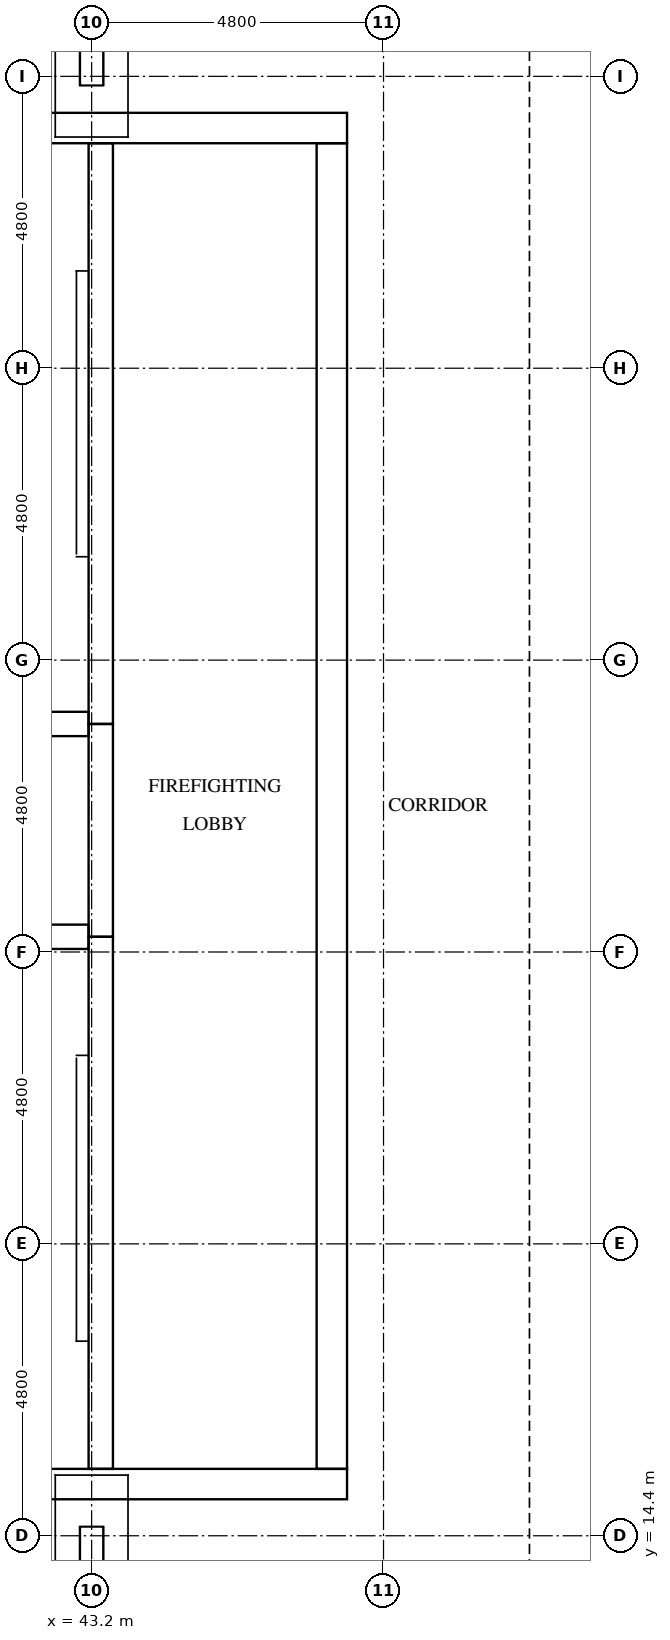
"""IFC4 building model, lengths in metres.
Left out: names, types, materials, properties, quantities, classifications, styles, units other than length and angle.
Written with IfcOpenShell. Run it as: python <this file> out.ifc"""

import sys

from ifc_helpers import new_model, si_unit, direction, frame, frame_2d, origin, place, context, subcontext, project, spatial, rectangle, extrude, element, fill, save


model = new_model("IFC4")
c1 = context("Model", 3, precision=1e-05, world=origin(), true_north=direction((0.0, 1.0)))
c2 = subcontext(c1, "Body", "Model", "MODEL_VIEW")
j1 = project(units=[si_unit("LENGTHUNIT", "METRE"), si_unit("PLANEANGLEUNIT", "RADIAN")], contexts=[c1])
p1 = place(None, origin())
s1 = spatial("IfcSite", under=j1, at=p1, CompositionType="ELEMENT")
p2 = place(p1, origin())
s2 = spatial("IfcBuilding", under=s1, at=p2, CompositionType="ELEMENT")
p3 = place(p2, frame((0.0, 0.0, 263.2)))
s3 = spatial("IfcBuildingStorey", under=s2, at=p3, CompositionType="ELEMENT", Elevation=263.2)
p4 = place(p3, frame((15.0, 15.25, 0.0), z_axis=(0.0, 0.0, 1.0), x_axis=(1.0, 0.0, 0.0)))
e1 = element("IfcWall", 1, at=p4, inside=s3, PredefinedType="SHEAR", context=c2, shape_type="SweptSolid", body=[
    extrude(rectangle(XDim=32.4, YDim=0.5, at=frame_2d((16.2, 0.0))), origin(), (0.0, 0.0, 1.0), 5.1),
])
p5 = place(p4, frame((15.3, 0.0, 0.0)))
e2 = element("IfcOpeningElement", 2, at=p5, cuts=e1, PredefinedType="OPENING", context=c2, shape_type="SweptSolid", body=[
    extrude(rectangle(XDim=1.8, YDim=2.1, at=frame_2d((0.9, 1.05))), frame((0.0, 0.26, 0.0), z_axis=(0.0, -1.0, 0.0), x_axis=(1.0, 0.0, 0.0)), (0.0, 0.0, 1.0), 0.52),
])
p6 = place(p3, frame((15.0, 37.55, 0.0), z_axis=(0.0, 0.0, 1.0), x_axis=(1.0, 0.0, 0.0)))
e3 = element("IfcWall", 3, at=p6, inside=s3, PredefinedType="SHEAR", context=c2, shape_type="SweptSolid", body=[
    extrude(rectangle(XDim=32.4, YDim=0.5, at=frame_2d((16.2, 0.0))), origin(), (0.0, 0.0, 1.0), 5.1),
])
p7 = place(p6, frame((15.3, 0.0, 0.0)))
e4 = element("IfcOpeningElement", 4, at=p7, cuts=e3, PredefinedType="OPENING", context=c2, shape_type="SweptSolid", body=[
    extrude(rectangle(XDim=1.8, YDim=2.1, at=frame_2d((0.9, 1.05))), frame((0.0, 0.26, 0.0), z_axis=(0.0, -1.0, 0.0), x_axis=(1.0, 0.0, 0.0)), (0.0, 0.0, 1.0), 0.52),
])
p8 = place(p6, frame((1.282, 0.0, 0.0)))
e5 = element("IfcOpeningElement", 5, at=p8, cuts=e3, PredefinedType="OPENING", context=c2, shape_type="SweptSolid", body=[
    extrude(rectangle(XDim=1.0, YDim=2.1, at=frame_2d((0.5, 1.05))), frame((0.0, 0.26, 0.0), z_axis=(0.0, -1.0, 0.0), x_axis=(1.0, 0.0, 0.0)), (0.0, 0.0, 1.0), 0.52),
])
p9 = place(p6, frame((5.082, 0.0, 0.0)))
e6 = element("IfcOpeningElement", 6, at=p9, cuts=e3, PredefinedType="OPENING", context=c2, shape_type="SweptSolid", body=[
    extrude(rectangle(XDim=1.0, YDim=2.1, at=frame_2d((0.5, 1.05))), frame((0.0, 0.26, 0.0), z_axis=(0.0, -1.0, 0.0), x_axis=(1.0, 0.0, 0.0)), (0.0, 0.0, 1.0), 0.52),
])
p10 = place(p3, frame((47.15, 15.5, 0.0), z_axis=(0.0, 0.0, 1.0), x_axis=(0.0, 1.0, 0.0)))
e7 = element("IfcWall", 7, at=p10, inside=s3, PredefinedType="SHEAR", context=c2, shape_type="SweptSolid", body=[
    extrude(rectangle(XDim=21.8, YDim=0.5, at=frame_2d((10.9, 0.0))), origin(), (0.0, 0.0, 1.0), 5.1),
])
p11 = place(p10, frame((10.6, 0.0, 0.0)))
e8 = element("IfcOpeningElement", 8, at=p11, cuts=e7, PredefinedType="OPENING", context=c2, shape_type="SweptSolid", body=[
    extrude(rectangle(XDim=1.2, YDim=2.1, at=frame_2d((0.6, 1.05))), frame((0.0, 0.26, 0.0), z_axis=(0.0, -1.0, 0.0), x_axis=(1.0, 0.0, 0.0)), (0.0, 0.0, 1.0), 0.52),
])
p12 = place(p3, frame((43.35, 15.5, 0.0), z_axis=(0.0, 0.0, 1.0), x_axis=(0.0, 1.0, 0.0)))
e9 = element("IfcWall", 9, at=p12, inside=s3, PredefinedType="SHEAR", context=c2, shape_type="SweptSolid", body=[
    extrude(rectangle(XDim=8.75, YDim=0.4, at=frame_2d((4.375, 0.0))), origin(), (0.0, 0.0, 1.0), 5.1),
])
p13 = place(p12, frame((0.7, 0.0, 0.0)))
e10 = element("IfcOpeningElement", 10, at=p13, cuts=e9, PredefinedType="OPENING", context=c2, shape_type="SweptSolid", body=[
    extrude(rectangle(XDim=1.2, YDim=2.1, at=frame_2d((0.6, 1.05))), frame((0.0, 0.21, 0.0), z_axis=(0.0, -1.0, 0.0), x_axis=(1.0, 0.0, 0.0)), (0.0, 0.0, 1.0), 0.42),
])
p14 = place(p3, frame((43.35, 24.25, 0.0), z_axis=(0.0, 0.0, 1.0), x_axis=(0.0, 1.0, 0.0)))
e11 = element("IfcWall", 11, at=p14, inside=s3, PredefinedType="SHEAR", context=c2, shape_type="SweptSolid", body=[
    extrude(rectangle(XDim=3.5, YDim=0.4, at=frame_2d((1.75, 0.0))), origin(), (0.0, 0.0, 1.0), 5.1),
])
p15 = place(p14, frame((1.2, 0.0, 0.0)))
e12 = element("IfcOpeningElement", 12, at=p15, cuts=e11, PredefinedType="OPENING", context=c2, shape_type="SweptSolid", body=[
    extrude(rectangle(XDim=1.1, YDim=2.1, at=frame_2d((0.55, 1.05))), frame((0.0, 0.21, 0.0), z_axis=(0.0, -1.0, 0.0), x_axis=(1.0, 0.0, 0.0)), (0.0, 0.0, 1.0), 0.42),
])
p16 = place(p3, frame((43.35, 27.75, 0.0), z_axis=(0.0, 0.0, 1.0), x_axis=(0.0, 1.0, 0.0)))
e13 = element("IfcWall", 13, at=p16, inside=s3, PredefinedType="SHEAR", context=c2, shape_type="SweptSolid", body=[
    extrude(rectangle(XDim=9.55, YDim=0.4, at=frame_2d((4.775, 0.0))), origin(), (0.0, 0.0, 1.0), 5.1),
])
p17 = place(p16, frame((7.65, 0.0, 0.0)))
e14 = element("IfcOpeningElement", 14, at=p17, cuts=e13, PredefinedType="OPENING", context=c2, shape_type="SweptSolid", body=[
    extrude(rectangle(XDim=1.2, YDim=2.1, at=frame_2d((0.6, 1.05))), frame((0.0, 0.21, 0.0), z_axis=(0.0, -1.0, 0.0), x_axis=(1.0, 0.0, 0.0)), (0.0, 0.0, 1.0), 0.42),
])
for number, where, z_axis, x_axis in (
    (15, (39.5, 24.25, 0.0), (0.0, 0.0, 1.0), (1.0, 0.0, 0.0)),
    (16, (39.5, 27.75, 0.0), (0.0, 0.0, 1.0), (1.0, 0.0, 0.0)),
):
    element("IfcWall", number, at=place(p3, frame(where, z_axis=z_axis, x_axis=x_axis)), inside=s3, PredefinedType="SHEAR", context=c2, shape_type="SweptSolid", body=[
        extrude(rectangle(XDim=3.65, YDim=0.4, at=frame_2d((1.825, 0.0))), origin(), (0.0, 0.0, 1.0), 5.1),
    ])
p18 = place(p15, origin())
e17 = element("IfcDoor", 17, at=p18, inside=s3, OperationType="DOUBLE_DOOR_SLIDING", PredefinedType="DOOR", context=c2, shape_type="SweptSolid", body=[
    extrude(rectangle(XDim=1.1, YDim=2.1, at=frame_2d((0.55, 1.05))), frame((0.0, 0.025, 0.0), z_axis=(0.0, -1.0, 0.0), x_axis=(1.0, 0.0, 0.0)), (0.0, 0.0, 1.0), 0.05),
])
fill(e12, e17)
p19 = place(p13, origin())
e18 = element("IfcDoor", 18, at=p19, inside=s3, OperationType="SINGLE_SWING_RIGHT", PredefinedType="DOOR", context=c2, shape_type="SweptSolid", body=[
    extrude(rectangle(XDim=1.2, YDim=2.1, at=frame_2d((0.6, 1.05))), frame((0.0, 0.025, 0.0), z_axis=(0.0, -1.0, 0.0), x_axis=(1.0, 0.0, 0.0)), (0.0, 0.0, 1.0), 0.05),
])
fill(e10, e18)
p20 = place(p17, origin())
e19 = element("IfcDoor", 19, at=p20, inside=s3, OperationType="SINGLE_SWING_LEFT", PredefinedType="DOOR", context=c2, shape_type="SweptSolid", body=[
    extrude(rectangle(XDim=1.2, YDim=2.1, at=frame_2d((0.6, 1.05))), frame((0.0, 0.025, 0.0), z_axis=(0.0, -1.0, 0.0), x_axis=(1.0, 0.0, 0.0)), (0.0, 0.0, 1.0), 0.05),
])
fill(e14, e19)
p21 = place(p11, origin())
e20 = element("IfcDoor", 20, at=p21, inside=s3, OperationType="SINGLE_SWING_LEFT", PredefinedType="DOOR", context=c2, shape_type="SweptSolid", body=[
    extrude(rectangle(XDim=1.2, YDim=2.1, at=frame_2d((0.6, 1.05))), frame((0.0, 0.025, 0.0), z_axis=(0.0, -1.0, 0.0), x_axis=(1.0, 0.0, 0.0)), (0.0, 0.0, 1.0), 0.05),
])
fill(e8, e20)
save(model, sys.argv[1])
